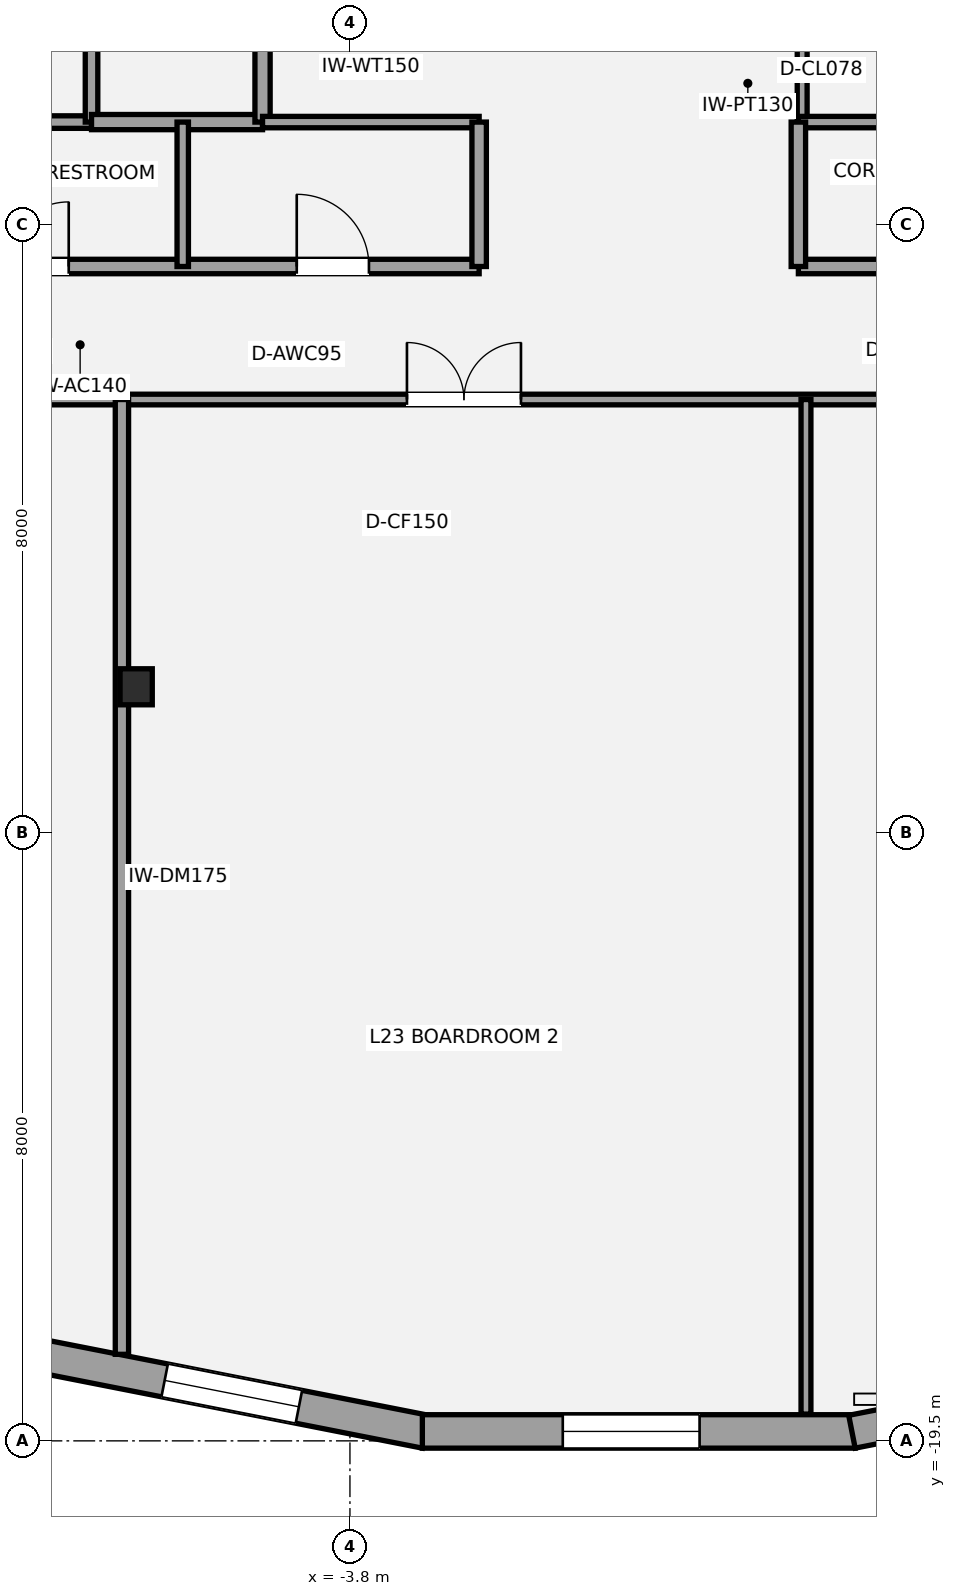
"""IFC4 building model, lengths in metres.
Left out: names, types, materials, properties, quantities, classifications, styles, units other than length and angle.
Written with IfcOpenShell. Run it as: python <this file> out.ifc"""

import sys

from ifc_helpers import new_model, si_unit, direction, frame, frame_2d, origin, origin_2d, place, context, subcontext, project, spatial, rectangle, i_section, extrude, element, fill, save


model = new_model("IFC4")
c1 = context("Model", 3, precision=1e-05, world=origin(), true_north=direction((0.0, 1.0)))
c2 = subcontext(c1, "Body", "Model", "MODEL_VIEW")
j1 = project(units=[si_unit("LENGTHUNIT", "METRE"), si_unit("PLANEANGLEUNIT", "RADIAN")], contexts=[c1])
p1 = place(None, origin())
s1 = spatial("IfcSite", under=j1, at=p1, CompositionType="ELEMENT")
p2 = place(p1, origin())
s2 = spatial("IfcBuilding", under=s1, at=p2, CompositionType="ELEMENT")
p3 = place(p2, frame((0.0, 0.0, 89.6)))
s3 = spatial("IfcBuildingStorey", under=s2, at=p3, CompositionType="ELEMENT", Elevation=89.6)
p4 = place(p3, frame((-6.613, -9.579, 0.0), z_axis=(0.0, 0.0, 1.0), x_axis=(1.0, 0.0, 0.0)))
e1 = element("IfcColumn", 1, at=p4, inside=s3, PredefinedType="COLUMN", context=c2, shape_type="SweptSolid", body=[
    extrude(i_section(OverallWidth=0.424, OverallDepth=0.474, WebThickness=0.048, FlangeThickness=0.077, at=origin_2d()), origin(), (0.0, 0.0, 1.0), 3.5),
])
p5 = place(p3, frame((-2.805, -19.38, 0.0), z_axis=(0.0, 0.0, 1.0), x_axis=(-0.981185300561, 0.19306839711, 0.0)))
e2 = element("IfcWall", 2, at=p5, inside=s3, PredefinedType="STANDARD", context=c2, shape_type="SweptSolid", body=[
    extrude(rectangle(XDim=5.548, YDim=0.44, at=frame_2d((2.774, 0.0))), origin(), (0.0, 0.0, 1.0), 2.528),
])
p6 = place(p5, frame((1.699, 0.0, 0.65)))
e3 = element("IfcOpeningElement", 3, at=p6, cuts=e2, PredefinedType="OPENING", context=c2, shape_type="SweptSolid", body=[
    extrude(rectangle(XDim=1.8, YDim=1.7, at=frame_2d((0.9, 0.85))), frame((0.0, 0.23, 0.0), z_axis=(0.0, -1.0, 0.0), x_axis=(1.0, 0.0, 0.0)), (0.0, 0.0, 1.0), 0.46),
])
p7 = place(p3, frame((2.847, -19.376, 0.0), z_axis=(0.0, 0.0, 1.0), x_axis=(-1.0, 0.0, 0.0)))
e4 = element("IfcWall", 4, at=p7, inside=s3, PredefinedType="STANDARD", context=c2, shape_type="SweptSolid", body=[
    extrude(rectangle(XDim=5.695, YDim=0.44, at=frame_2d((2.847, 0.0))), origin(), (0.0, 0.0, 1.0), 2.528),
])
p8 = place(p7, frame((2.047, 0.0, 0.65)))
e5 = element("IfcOpeningElement", 5, at=p8, cuts=e4, PredefinedType="OPENING", context=c2, shape_type="SweptSolid", body=[
    extrude(rectangle(XDim=1.8, YDim=1.7, at=frame_2d((0.9, 0.85))), frame((0.0, 0.23, 0.0), z_axis=(0.0, -1.0, 0.0), x_axis=(1.0, 0.0, 0.0)), (0.0, 0.0, 1.0), 0.46),
])
p9 = place(p3, frame((8.248, -18.309, 0.0), z_axis=(0.0, 0.0, 1.0), x_axis=(-0.981185300561, -0.19306839711, 0.0)))
e6 = element("IfcWall", 6, at=p9, inside=s3, PredefinedType="STANDARD", context=c2, shape_type="SweptSolid", body=[
    extrude(rectangle(XDim=5.548, YDim=0.44, at=frame_2d((2.774, 0.0))), origin(), (0.0, 0.0, 1.0), 2.528),
])
p10 = place(p9, frame((1.699, 0.0, 0.65)))
e7 = element("IfcOpeningElement", 7, at=p10, cuts=e6, PredefinedType="OPENING", context=c2, shape_type="SweptSolid", body=[
    extrude(rectangle(XDim=1.8, YDim=1.7, at=frame_2d((0.9, 0.85))), frame((0.0, 0.23, 0.0), z_axis=(0.0, -1.0, 0.0), x_axis=(1.0, 0.0, 0.0)), (0.0, 0.0, 1.0), 0.46),
])
p11 = place(p3, frame((-13.45, -2.15, 0.0), z_axis=(0.0, 0.0, 1.0), x_axis=(1.0, 0.0, 0.0)))
e8 = element("IfcWall", 8, at=p11, inside=s3, PredefinedType="PARTITIONING", context=c2, shape_type="SweptSolid", body=[
    extrude(rectangle(XDim=6.25, YDim=0.165, at=frame_2d((3.125, 0.0))), origin(), (0.0, 0.0, 1.0), 3.31),
])
p12 = place(p3, frame((-7.2, -2.15, 0.0), z_axis=(0.0, 0.0, 1.0), x_axis=(0.0, 1.0, 0.0)))
e9 = element("IfcWall", 9, at=p12, inside=s3, PredefinedType="PARTITIONING", context=c2, shape_type="SweptSolid", body=[
    extrude(rectangle(XDim=3.3, YDim=0.165, at=frame_2d((1.65, 0.0))), origin(), (0.0, 0.0, 1.0), 2.763),
])
p13 = place(p3, frame((-7.2, -2.15, 0.0), z_axis=(0.0, 0.0, 1.0), x_axis=(1.0, 0.0, 0.0)))
e10 = element("IfcWall", 10, at=p13, inside=s3, PredefinedType="SOLIDWALL", context=c2, shape_type="SweptSolid", body=[
    extrude(rectangle(XDim=2.25, YDim=0.2, at=frame_2d((1.125, 0.0))), origin(), (0.0, 0.0, 1.0), 2.763),
])
p14 = place(p3, frame((-4.95, -2.15, 0.0), z_axis=(0.0, 0.0, 1.0), x_axis=(0.0, 1.0, 0.0)))
e11 = element("IfcWall", 11, at=p14, inside=s3, PredefinedType="SOLIDWALL", context=c2, shape_type="SweptSolid", body=[
    extrude(rectangle(XDim=3.3, YDim=0.2, at=frame_2d((1.65, 0.0))), origin(), (0.0, 0.0, 1.0), 2.763),
])
p15 = place(p14, frame((0.95, 0.0, 0.0)))
e12 = element("IfcOpeningElement", 12, at=p15, cuts=e11, PredefinedType="OPENING", context=c2, shape_type="SweptSolid", body=[
    extrude(rectangle(XDim=0.75, YDim=2.1, at=frame_2d((0.375, 1.05))), frame((0.0, 0.11, 0.0), z_axis=(0.0, -1.0, 0.0), x_axis=(1.0, 0.0, 0.0)), (0.0, 0.0, 1.0), 0.22),
])
p16 = place(p3, frame((2.15, -2.15, 0.0), z_axis=(0.0, 0.0, 1.0), x_axis=(0.0, 1.0, 0.0)))
e13 = element("IfcWall", 13, at=p16, inside=s3, PredefinedType="PARTITIONING", context=c2, shape_type="SweptSolid", body=[
    extrude(rectangle(XDim=1.8, YDim=0.13, at=frame_2d((0.9, 0.0))), origin(), (0.0, 0.0, 1.0), 3.31),
])
p17 = place(p3, frame((-13.45, -4.05, 0.0), z_axis=(0.0, 0.0, 1.0), x_axis=(1.0, 0.0, 0.0)))
e14 = element("IfcWall", 14, at=p17, inside=s3, PredefinedType="PLUMBINGWALL", context=c2, shape_type="SweptSolid", body=[
    extrude(rectangle(XDim=11.35, YDim=0.19, at=frame_2d((5.675, 0.0))), origin(), (0.0, 0.0, 1.0), 2.763),
])
p18 = place(p17, frame((1.25, 0.0, 0.0)))
e15 = element("IfcOpeningElement", 15, at=p18, cuts=e14, PredefinedType="OPENING", context=c2, shape_type="SweptSolid", body=[
    extrude(rectangle(XDim=0.85, YDim=2.1, at=frame_2d((0.425, 1.05))), frame((0.0, 0.105, 0.0), z_axis=(0.0, -1.0, 0.0), x_axis=(1.0, 0.0, 0.0)), (0.0, 0.0, 1.0), 0.21),
])
p19 = place(p17, frame((5.1, 0.0, 0.0)))
e16 = element("IfcOpeningElement", 16, at=p19, cuts=e14, PredefinedType="OPENING", context=c2, shape_type="SweptSolid", body=[
    extrude(rectangle(XDim=0.85, YDim=2.1, at=frame_2d((0.425, 1.05))), frame((0.0, 0.105, 0.0), z_axis=(0.0, -1.0, 0.0), x_axis=(1.0, 0.0, 0.0)), (0.0, 0.0, 1.0), 0.21),
])
p20 = place(p17, frame((8.95, 0.0, 0.0)))
e17 = element("IfcOpeningElement", 17, at=p20, cuts=e14, PredefinedType="OPENING", context=c2, shape_type="SweptSolid", body=[
    extrude(rectangle(XDim=0.95, YDim=2.15, at=frame_2d((0.475, 1.075))), frame((0.0, 0.105, 0.0), z_axis=(0.0, -1.0, 0.0), x_axis=(1.0, 0.0, 0.0)), (0.0, 0.0, 1.0), 0.21),
])
p21 = place(p3, frame((-4.95, -2.15, 0.0), z_axis=(0.0, 0.0, 1.0), x_axis=(1.0, 0.0, 0.0)))
e18 = element("IfcWall", 18, at=p21, inside=s3, PredefinedType="PLUMBINGWALL", context=c2, shape_type="SweptSolid", body=[
    extrude(rectangle(XDim=2.85, YDim=0.15, at=frame_2d((1.425, 0.0))), origin(), (0.0, 0.0, 1.0), 3.31),
])
p22 = place(p3, frame((-2.1, -4.05, 0.0), z_axis=(0.0, 0.0, 1.0), x_axis=(0.0, 1.0, 0.0)))
e19 = element("IfcWall", 19, at=p22, inside=s3, PredefinedType="PLUMBINGWALL", context=c2, shape_type="SweptSolid", body=[
    extrude(rectangle(XDim=1.9, YDim=0.19, at=frame_2d((0.95, 0.0))), origin(), (0.0, 0.0, 1.0), 3.31),
])
p23 = place(p3, frame((-6.0, -4.05, 0.0), z_axis=(0.0, 0.0, 1.0), x_axis=(0.0, 1.0, 0.0)))
e20 = element("IfcWall", 20, at=p23, inside=s3, PredefinedType="PLUMBINGWALL", context=c2, shape_type="SweptSolid", body=[
    extrude(rectangle(XDim=1.9, YDim=0.15, at=frame_2d((0.95, 0.0))), origin(), (0.0, 0.0, 1.0), 2.751),
])
p24 = place(p3, frame((2.1, -4.05, 0.0), z_axis=(0.0, 0.0, 1.0), x_axis=(1.0, 0.0, 0.0)))
e21 = element("IfcWall", 21, at=p24, inside=s3, PredefinedType="PLUMBINGWALL", context=c2, shape_type="SweptSolid", body=[
    extrude(rectangle(XDim=11.35, YDim=0.19, at=frame_2d((5.675, 0.0))), origin(), (0.0, 0.0, 1.0), 2.763),
])
p25 = place(p24, frame((1.4, 0.0, 0.0)))
e22 = element("IfcOpeningElement", 22, at=p25, cuts=e21, PredefinedType="OPENING", context=c2, shape_type="SweptSolid", body=[
    extrude(rectangle(XDim=0.9, YDim=2.1, at=frame_2d((0.45, 1.05))), frame((0.0, 0.105, 0.0), z_axis=(0.0, -1.0, 0.0), x_axis=(1.0, 0.0, 0.0)), (0.0, 0.0, 1.0), 0.21),
])
p26 = place(p24, frame((5.3, 0.0, 0.0)))
e23 = element("IfcOpeningElement", 23, at=p26, cuts=e21, PredefinedType="OPENING", context=c2, shape_type="SweptSolid", body=[
    extrude(rectangle(XDim=0.9, YDim=2.1, at=frame_2d((0.45, 1.05))), frame((0.0, 0.105, 0.0), z_axis=(0.0, -1.0, 0.0), x_axis=(1.0, 0.0, 0.0)), (0.0, 0.0, 1.0), 0.21),
])
p27 = place(p24, frame((9.1, 0.0, 0.0)))
e24 = element("IfcOpeningElement", 24, at=p27, cuts=e21, PredefinedType="OPENING", context=c2, shape_type="SweptSolid", body=[
    extrude(rectangle(XDim=0.9, YDim=2.1, at=frame_2d((0.45, 1.05))), frame((0.0, 0.105, 0.0), z_axis=(0.0, -1.0, 0.0), x_axis=(1.0, 0.0, 0.0)), (0.0, 0.0, 1.0), 0.21),
])
p28 = place(p3, frame((2.1, -2.15, 0.0), z_axis=(0.0, 0.0, 1.0), x_axis=(1.0, 0.0, 0.0)))
e25 = element("IfcWall", 25, at=p28, inside=s3, PredefinedType="PLUMBINGWALL", context=c2, shape_type="SweptSolid", body=[
    extrude(rectangle(XDim=2.85, YDim=0.15, at=frame_2d((1.425, 0.0))), origin(), (0.0, 0.0, 1.0), 3.31),
])
p29 = place(p3, frame((2.1, -4.05, 0.0), z_axis=(0.0, 0.0, 1.0), x_axis=(0.0, 1.0, 0.0)))
e26 = element("IfcWall", 26, at=p29, inside=s3, PredefinedType="PLUMBINGWALL", context=c2, shape_type="SweptSolid", body=[
    extrude(rectangle(XDim=1.9, YDim=0.19, at=frame_2d((0.95, 0.0))), origin(), (0.0, 0.0, 1.0), 3.31),
])
p30 = place(p3, frame((-16.2, -5.8, 0.0), z_axis=(0.0, 0.0, 1.0), x_axis=(1.0, 0.0, 0.0)))
e27 = element("IfcWall", 27, at=p30, inside=s3, PredefinedType="PARTITIONING", context=c2, shape_type="SweptSolid", body=[
    extrude(rectangle(XDim=32.4, YDim=0.14, at=frame_2d((16.2, 0.0))), origin(), (0.0, 0.0, 1.0), 2.763),
])
p31 = place(p30, frame((4.25, 0.0, 0.0)))
e28 = element("IfcOpeningElement", 28, at=p31, cuts=e27, PredefinedType="OPENING", context=c2, shape_type="SweptSolid", body=[
    extrude(rectangle(XDim=0.9, YDim=2.1, at=frame_2d((0.45, 1.05))), frame((0.0, 0.08, 0.0), z_axis=(0.0, -1.0, 0.0), x_axis=(1.0, 0.0, 0.0)), (0.0, 0.0, 1.0), 0.16),
])
p32 = place(p30, frame((13.15, 0.0, 0.0)))
e29 = element("IfcOpeningElement", 29, at=p32, cuts=e27, PredefinedType="OPENING", context=c2, shape_type="SweptSolid", body=[
    extrude(rectangle(XDim=1.5, YDim=2.15, at=frame_2d((0.75, 1.075))), frame((0.0, 0.08, 0.0), z_axis=(0.0, -1.0, 0.0), x_axis=(1.0, 0.0, 0.0)), (0.0, 0.0, 1.0), 0.16),
])
p33 = place(p30, frame((21.45, 0.0, 0.0)))
e30 = element("IfcOpeningElement", 30, at=p33, cuts=e27, PredefinedType="OPENING", context=c2, shape_type="SweptSolid", body=[
    extrude(rectangle(XDim=0.9, YDim=2.1, at=frame_2d((0.45, 1.05))), frame((0.0, 0.08, 0.0), z_axis=(0.0, -1.0, 0.0), x_axis=(1.0, 0.0, 0.0)), (0.0, 0.0, 1.0), 0.16),
])
p34 = place(p30, frame((28.15, 0.0, 0.0)))
e31 = element("IfcOpeningElement", 31, at=p34, cuts=e27, PredefinedType="OPENING", context=c2, shape_type="SweptSolid", body=[
    extrude(rectangle(XDim=1.5, YDim=2.15, at=frame_2d((0.75, 1.075))), frame((0.0, 0.08, 0.0), z_axis=(0.0, -1.0, 0.0), x_axis=(1.0, 0.0, 0.0)), (0.0, 0.0, 1.0), 0.16),
])
p35 = place(p3, frame((-6.8, -18.361, 0.0), z_axis=(0.0, 0.0, 1.0), x_axis=(0.0, 1.0, 0.0)))
e32 = element("IfcWall", 32, at=p35, inside=s3, PredefinedType="PARTITIONING", context=c2, shape_type="SweptSolid", body=[
    extrude(rectangle(XDim=12.561, YDim=0.175, at=frame_2d((6.281, 0.0))), origin(), (0.0, 0.0, 1.0), 2.751),
])
p36 = place(p3, frame((2.2, -19.148, 0.0), z_axis=(0.0, 0.0, 1.0), x_axis=(0.0, 1.0, 0.0)))
e33 = element("IfcWall", 33, at=p36, inside=s3, PredefinedType="PARTITIONING", context=c2, shape_type="SweptSolid", body=[
    extrude(rectangle(XDim=13.348, YDim=0.13, at=frame_2d((6.674, 0.0))), origin(), (0.0, 0.0, 1.0), 2.763),
])
p37 = place(p6, origin())
e34 = element("IfcWindow", 34, at=p37, inside=s3, PartitioningType="SINGLE_PANEL", PredefinedType="WINDOW", context=c2, shape_type="SweptSolid", body=[
    extrude(rectangle(XDim=1.8, YDim=1.7, at=frame_2d((0.9, 0.85))), frame((0.0, -0.01, 0.0), z_axis=(0.0, -1.0, 0.0), x_axis=(1.0, 0.0, 0.0)), (0.0, 0.0, 1.0), 0.06),
])
fill(e3, e34)
p38 = place(p8, origin())
e35 = element("IfcWindow", 35, at=p38, inside=s3, PartitioningType="SINGLE_PANEL", PredefinedType="WINDOW", context=c2, shape_type="SweptSolid", body=[
    extrude(rectangle(XDim=1.8, YDim=1.7, at=frame_2d((0.9, 0.85))), frame((0.0, -0.01, 0.0), z_axis=(0.0, -1.0, 0.0), x_axis=(1.0, 0.0, 0.0)), (0.0, 0.0, 1.0), 0.06),
])
fill(e5, e35)
p39 = place(p19, origin())
e36 = element("IfcDoor", 36, at=p39, inside=s3, OperationType="SINGLE_SWING_RIGHT", PredefinedType="DOOR", context=c2, shape_type="SweptSolid", body=[
    extrude(rectangle(XDim=0.85, YDim=2.1, at=frame_2d((0.425, 1.05))), frame((0.0, 0.025, 0.0), z_axis=(0.0, -1.0, 0.0), x_axis=(1.0, 0.0, 0.0)), (0.0, 0.0, 1.0), 0.05),
])
fill(e16, e36)
p40 = place(p20, origin())
e37 = element("IfcDoor", 37, at=p40, inside=s3, OperationType="SINGLE_SWING_LEFT", PredefinedType="DOOR", context=c2, shape_type="SweptSolid", body=[
    extrude(rectangle(XDim=0.95, YDim=2.15, at=frame_2d((0.475, 1.075))), frame((0.0, 0.025, 0.0), z_axis=(0.0, -1.0, 0.0), x_axis=(1.0, 0.0, 0.0)), (0.0, 0.0, 1.0), 0.05),
])
fill(e17, e37)
p41 = place(p32, origin())
e38 = element("IfcDoor", 38, at=p41, inside=s3, OperationType="DOUBLE_DOOR_SINGLE_SWING", PredefinedType="DOOR", context=c2, shape_type="SweptSolid", body=[
    extrude(rectangle(XDim=1.5, YDim=2.15, at=frame_2d((0.75, 1.075))), frame((0.0, 0.025, 0.0), z_axis=(0.0, -1.0, 0.0), x_axis=(1.0, 0.0, 0.0)), (0.0, 0.0, 1.0), 0.05),
])
fill(e29, e38)
save(model, sys.argv[1])
